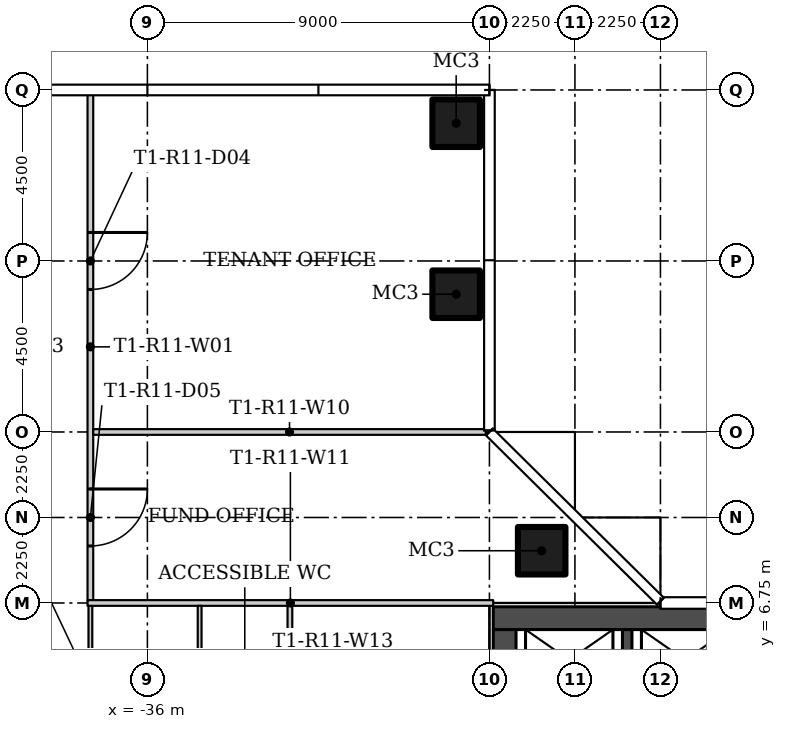
"""IFC4 building model, lengths in metres.
Left out: names, types, materials, properties, quantities, classifications, styles, units other than length and angle.
Written with IfcOpenShell. Run it as: python <this file> out.ifc"""

import sys

from ifc_helpers import new_model, si_unit, direction, frame, frame_2d, origin, origin_2d, place, context, subcontext, project, spatial, rectangle, hollow_rectangle, extrude, element, fill, save


model = new_model("IFC4")
c1 = context("Model", 3, precision=1e-05, world=origin(), true_north=direction((0.0, 1.0)))
c2 = subcontext(c1, "Body", "Model", "MODEL_VIEW")
j1 = project(units=[si_unit("LENGTHUNIT", "METRE"), si_unit("PLANEANGLEUNIT", "RADIAN")], contexts=[c1])
p1 = place(None, origin())
s1 = spatial("IfcSite", under=j1, at=p1, CompositionType="ELEMENT")
p2 = place(p1, origin())
s2 = spatial("IfcBuilding", under=s1, at=p2, CompositionType="ELEMENT")
p3 = place(p2, frame((0.0, 0.0, 109.2)))
s3 = spatial("IfcBuildingStorey", under=s2, at=p3, CompositionType="ELEMENT", Elevation=109.2)
for number, where in (
    (1, (-25.625, 8.125, 0.0)),
    (2, (-27.875, 14.875, 0.0)),
    (3, (-27.875, 19.375, 0.0)),
):
    element("IfcColumn", number, at=place(p3, frame(where)), inside=s3, PredefinedType="COLUMN", context=c2, shape_type="SweptSolid", body=[
        extrude(hollow_rectangle(XDim=1.25, YDim=1.25, WallThickness=0.05, at=origin_2d()), origin(), (0.0, 0.0, 1.0), 3.55),
    ])
p4 = place(p3, frame((-37.5, 20.155, 0.0), z_axis=(0.0, 0.0, 1.0), x_axis=(0.0, -1.0, 0.0)))
e4 = element("IfcWall", 4, at=p4, inside=s3, PredefinedType="PARTITIONING", context=c2, shape_type="SweptSolid", body=[
    extrude(rectangle(XDim=13.33, YDim=0.15, at=frame_2d((6.665, 0.0))), origin(), (0.0, 0.0, 1.0), 3.55),
])
p5 = place(p4, frame((3.655, 0.0, 0.0)))
e5 = element("IfcOpeningElement", 5, at=p5, cuts=e4, PredefinedType="OPENING", context=c2, shape_type="SweptSolid", body=[
    extrude(rectangle(XDim=1.5, YDim=2.1, at=frame_2d((0.75, 1.05))), frame((0.0, 0.085, 0.0), z_axis=(0.0, -1.0, 0.0), x_axis=(1.0, 0.0, 0.0)), (0.0, 0.0, 1.0), 0.17),
])
p6 = place(p4, frame((10.405, 0.0, 0.0)))
e6 = element("IfcOpeningElement", 6, at=p6, cuts=e4, PredefinedType="OPENING", context=c2, shape_type="SweptSolid", body=[
    extrude(rectangle(XDim=1.5, YDim=2.1, at=frame_2d((0.75, 1.05))), frame((0.0, 0.085, 0.0), z_axis=(0.0, -1.0, 0.0), x_axis=(1.0, 0.0, 0.0)), (0.0, 0.0, 1.0), 0.17),
])
p7 = place(p3, frame((-37.5, 6.675, 0.0), z_axis=(0.0, 0.0, 1.0), x_axis=(0.0, -1.0, 0.0)))
e7 = element("IfcWall", 7, at=p7, inside=s3, PredefinedType="PARTITIONING", context=c2, shape_type="SweptSolid", body=[
    extrude(rectangle(XDim=4.175, YDim=0.1, at=frame_2d((2.087, 0.0))), origin(), (0.0, 0.0, 1.0), 3.55),
])
p8 = place(p3, frame((-27.095, 11.25, 0.0), z_axis=(0.0, 0.0, 1.0), x_axis=(-1.0, 0.0, 0.0)))
e8 = element("IfcWall", 8, at=p8, inside=s3, PredefinedType="PARTITIONING", context=c2, shape_type="SweptSolid", body=[
    extrude(rectangle(XDim=10.33, YDim=0.15, at=frame_2d((5.165, 0.0))), origin(), (0.0, 0.0, 1.0), 3.55),
])
p9 = place(p3, frame((-37.575, 6.75, 0.0)))
e9 = element("IfcWall", 9, at=p9, inside=s3, PredefinedType="PARTITIONING", context=c2, shape_type="SweptSolid", body=[
    extrude(rectangle(XDim=10.675, YDim=0.15, at=frame_2d((5.337, 0.0))), origin(), (0.0, 0.0, 1.0), 3.55),
])
p10 = place(p3, frame((-34.625, 2.5, 0.0), z_axis=(0.0, 0.0, 1.0), x_axis=(0.0, 1.0, 0.0)))
e10 = element("IfcWall", 10, at=p10, inside=s3, PredefinedType="PARTITIONING", context=c2, shape_type="SweptSolid", body=[
    extrude(rectangle(XDim=4.175, YDim=0.1, at=frame_2d((2.087, 0.0))), origin(), (0.0, 0.0, 1.0), 3.55),
])
p11 = place(p3, frame((-32.25, 2.513, 0.0), z_axis=(0.0, 0.0, 1.0), x_axis=(0.0, 1.0, 0.0)))
e11 = element("IfcWall", 11, at=p11, inside=s3, PredefinedType="PARTITIONING", context=c2, shape_type="SweptSolid", body=[
    extrude(rectangle(XDim=4.162, YDim=0.125, at=frame_2d((2.081, 0.0))), origin(), (0.0, 0.0, 1.0), 3.55),
])
p12 = place(p3, frame((-26.9, 6.35, 0.0)))
e12 = element("IfcWall", 12, at=p12, inside=s3, PredefinedType="SHEAR", context=c2, shape_type="SweptSolid", body=[
    extrude(rectangle(XDim=13.3, YDim=0.6, at=frame_2d((6.65, 0.0))), origin(), (0.0, 0.0, 1.0), 3.55),
])
p13 = place(p3, frame((-26.6, 6.05, 0.0), z_axis=(0.0, 0.0, 1.0), x_axis=(0.0, -1.0, 0.0)))
e13 = element("IfcWall", 13, at=p13, inside=s3, PredefinedType="SHEAR", context=c2, shape_type="SweptSolid", body=[
    extrude(rectangle(XDim=12.1, YDim=0.6, at=frame_2d((6.05, 0.0))), origin(), (0.0, 0.0, 1.0), 3.55),
])
p14 = place(p13, frame((3.9, 0.0, 0.0)))
e14 = element("IfcOpeningElement", 14, at=p14, cuts=e13, PredefinedType="OPENING", context=c2, shape_type="SweptSolid", body=[
    extrude(rectangle(XDim=1.8, YDim=2.4, at=frame_2d((0.9, 1.2))), frame((0.0, 0.31, 0.0), z_axis=(0.0, -1.0, 0.0), x_axis=(1.0, 0.0, 0.0)), (0.0, 0.0, 1.0), 0.62),
])
p15 = place(p3, frame((-23.375, 3.25, 0.0), z_axis=(0.0, 0.0, 1.0), x_axis=(0.0, 1.0, 0.0)))
e15 = element("IfcWall", 15, at=p15, inside=s3, PredefinedType="SHEAR", context=c2, shape_type="SweptSolid", body=[
    extrude(rectangle(XDim=2.8, YDim=0.25, at=frame_2d((1.4, 0.0))), origin(), (0.0, 0.0, 1.0), 3.55),
])
p16 = place(p5, origin())
e16 = element("IfcDoor", 16, at=p16, inside=s3, OperationType="DOUBLE_DOOR_SINGLE_SWING", PredefinedType="DOOR", context=c2, shape_type="SweptSolid", body=[
    extrude(rectangle(XDim=1.5, YDim=2.1, at=frame_2d((0.75, 1.05))), frame((0.0, 0.025, 0.0), z_axis=(0.0, -1.0, 0.0), x_axis=(1.0, 0.0, 0.0)), (0.0, 0.0, 1.0), 0.05),
])
fill(e5, e16)
p17 = place(p6, origin())
e17 = element("IfcDoor", 17, at=p17, inside=s3, OperationType="DOUBLE_DOOR_SINGLE_SWING", PredefinedType="DOOR", context=c2, shape_type="SweptSolid", body=[
    extrude(rectangle(XDim=1.5, YDim=2.1, at=frame_2d((0.75, 1.05))), frame((0.0, 0.025, 0.0), z_axis=(0.0, -1.0, 0.0), x_axis=(1.0, 0.0, 0.0)), (0.0, 0.0, 1.0), 0.05),
])
fill(e6, e17)
save(model, sys.argv[1])
